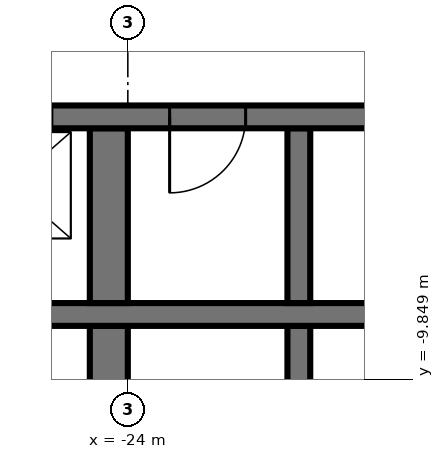
"""IFC4 building model, lengths in metres.
Left out: names, types, materials, properties, quantities, classifications, styles, units other than length and angle.
Written with IfcOpenShell. Run it as: python <this file> out.ifc"""

import sys

from ifc_helpers import new_model, si_unit, direction, frame, frame_2d, origin, place, context, subcontext, project, spatial, rectangle, extrude, element, fill, save


model = new_model("IFC4")
c1 = context("Model", 3, precision=1e-05, world=origin(), true_north=direction((0.0, 1.0)))
c2 = subcontext(c1, "Body", "Model", "MODEL_VIEW")
j1 = project(units=[si_unit("LENGTHUNIT", "METRE"), si_unit("PLANEANGLEUNIT", "RADIAN")], contexts=[c1])
p1 = place(None, origin())
s1 = spatial("IfcSite", under=j1, at=p1, CompositionType="ELEMENT")
p2 = place(p1, origin())
s2 = spatial("IfcBuilding", under=s1, at=p2, CompositionType="ELEMENT")
p3 = place(p2, frame((0.0, 0.0, 88.8)))
s3 = spatial("IfcBuildingStorey", under=s2, at=p3, CompositionType="ELEMENT", Elevation=88.8)
p4 = place(p3, frame((-29.05, -6.4, 0.0), z_axis=(0.0, 0.0, 1.0), x_axis=(1.0, 0.0, 0.0)))
e1 = element("IfcWall", 1, at=p4, inside=s3, PredefinedType="SHEAR", context=c2, shape_type="SweptSolid", body=[
    extrude(rectangle(XDim=18.7, YDim=0.3, at=frame_2d((9.35, 0.0))), origin(), (0.0, 0.0, 1.0), 3.6),
])
p5 = place(p4, frame((2.95, 0.0, 0.0)))
e2 = element("IfcOpeningElement", 2, at=p5, cuts=e1, PredefinedType="OPENING", context=c2, shape_type="SweptSolid", body=[
    extrude(rectangle(XDim=1.1, YDim=2.1, at=frame_2d((0.55, 1.05))), frame((0.0, 0.16, 0.0), z_axis=(0.0, -1.0, 0.0), x_axis=(1.0, 0.0, 0.0)), (0.0, 0.0, 1.0), 0.32),
])
p6 = place(p4, frame((0.55, 0.0, 0.0)))
e3 = element("IfcOpeningElement", 3, at=p6, cuts=e1, PredefinedType="OPENING", context=c2, shape_type="SweptSolid", body=[
    extrude(rectangle(XDim=1.1, YDim=2.1, at=frame_2d((0.55, 1.05))), frame((0.0, 0.16, 0.0), z_axis=(0.0, -1.0, 0.0), x_axis=(1.0, 0.0, 0.0)), (0.0, 0.0, 1.0), 0.32),
])
p7 = place(p4, frame((10.8, 0.0, 0.0)))
e4 = element("IfcOpeningElement", 4, at=p7, cuts=e1, PredefinedType="OPENING", context=c2, shape_type="SweptSolid", body=[
    extrude(rectangle(XDim=1.1, YDim=2.1, at=frame_2d((0.55, 1.05))), frame((0.0, 0.16, 0.0), z_axis=(0.0, -1.0, 0.0), x_axis=(1.0, 0.0, 0.0)), (0.0, 0.0, 1.0), 0.32),
])
p8 = place(p4, frame((5.6, 0.0, 0.0)))
e5 = element("IfcOpeningElement", 5, at=p8, cuts=e1, PredefinedType="OPENING", context=c2, shape_type="SweptSolid", body=[
    extrude(rectangle(XDim=1.0, YDim=2.1, at=frame_2d((0.5, 1.05))), frame((0.0, 0.16, 0.0), z_axis=(0.0, -1.0, 0.0), x_axis=(1.0, 0.0, 0.0)), (0.0, 0.0, 1.0), 0.32),
])
p9 = place(p3, frame((-29.05, -9.0, 0.0), z_axis=(0.0, 0.0, 1.0), x_axis=(1.0, 0.0, 0.0)))
e6 = element("IfcWall", 6, at=p9, inside=s3, PredefinedType="SHEAR", context=c2, shape_type="SweptSolid", body=[
    extrude(rectangle(XDim=18.7, YDim=0.3, at=frame_2d((9.35, 0.0))), origin(), (0.0, 0.0, 1.0), 3.6),
])
p10 = place(p9, frame((13.8, 0.0, 0.0)))
e7 = element("IfcOpeningElement", 7, at=p10, cuts=e6, PredefinedType="OPENING", context=c2, shape_type="SweptSolid", body=[
    extrude(rectangle(XDim=1.1, YDim=2.1, at=frame_2d((0.55, 1.05))), frame((0.0, 0.16, 0.0), z_axis=(0.0, -1.0, 0.0), x_axis=(1.0, 0.0, 0.0)), (0.0, 0.0, 1.0), 0.32),
])
p11 = place(p3, frame((-21.75, -8.85, 0.0), z_axis=(0.0, 0.0, 1.0), x_axis=(0.0, 1.0, 0.0)))
e8 = element("IfcWall", 8, at=p11, inside=s3, PredefinedType="SHEAR", context=c2, shape_type="SweptSolid", body=[
    extrude(rectangle(XDim=2.3, YDim=0.3, at=frame_2d((1.15, 0.0))), origin(), (0.0, 0.0, 1.0), 3.6),
])
p12 = place(p3, frame((-21.75, -14.55, 0.0), z_axis=(0.0, 0.0, 1.0), x_axis=(0.0, 1.0, 0.0)))
e9 = element("IfcWall", 9, at=p12, inside=s3, PredefinedType="SHEAR", context=c2, shape_type="SweptSolid", body=[
    extrude(rectangle(XDim=5.4, YDim=0.3, at=frame_2d((2.7, 0.0))), origin(), (0.0, 0.0, 1.0), 3.6),
])
p13 = place(p3, frame((-24.25, -8.85, 0.0), z_axis=(0.0, 0.0, 1.0), x_axis=(0.0, 1.0, 0.0)))
e10 = element("IfcWall", 10, at=p13, inside=s3, PredefinedType="SHEAR", context=c2, shape_type="SweptSolid", body=[
    extrude(rectangle(XDim=2.3, YDim=0.5, at=frame_2d((1.15, 0.0))), origin(), (0.0, 0.0, 1.0), 3.6),
])
p14 = place(p3, frame((-24.25, -14.55, 0.0), z_axis=(0.0, 0.0, 1.0), x_axis=(0.0, 1.0, 0.0)))
e11 = element("IfcWall", 11, at=p14, inside=s3, PredefinedType="SHEAR", context=c2, shape_type="SweptSolid", body=[
    extrude(rectangle(XDim=5.4, YDim=0.5, at=frame_2d((2.7, 0.0))), origin(), (0.0, 0.0, 1.0), 3.6),
])
p15 = place(p8, frame((0.5, 0.0, 0.0), z_axis=(0.0, 0.0, 1.0), x_axis=(-1.0, 0.0, 0.0)))
e12 = element("IfcDoor", 12, at=p15, inside=s3, OperationType="SINGLE_SWING_LEFT", PredefinedType="DOOR", context=c2, shape_type="SweptSolid", body=[
    extrude(rectangle(XDim=1.0, YDim=2.1, at=frame_2d((0.0, 1.05))), frame((0.0, -0.025, 0.0), z_axis=(0.0, 1.0, 0.0), x_axis=(-1.0, 0.0, 0.0)), (0.0, 0.0, 1.0), 0.05),
])
fill(e5, e12)
save(model, sys.argv[1])
